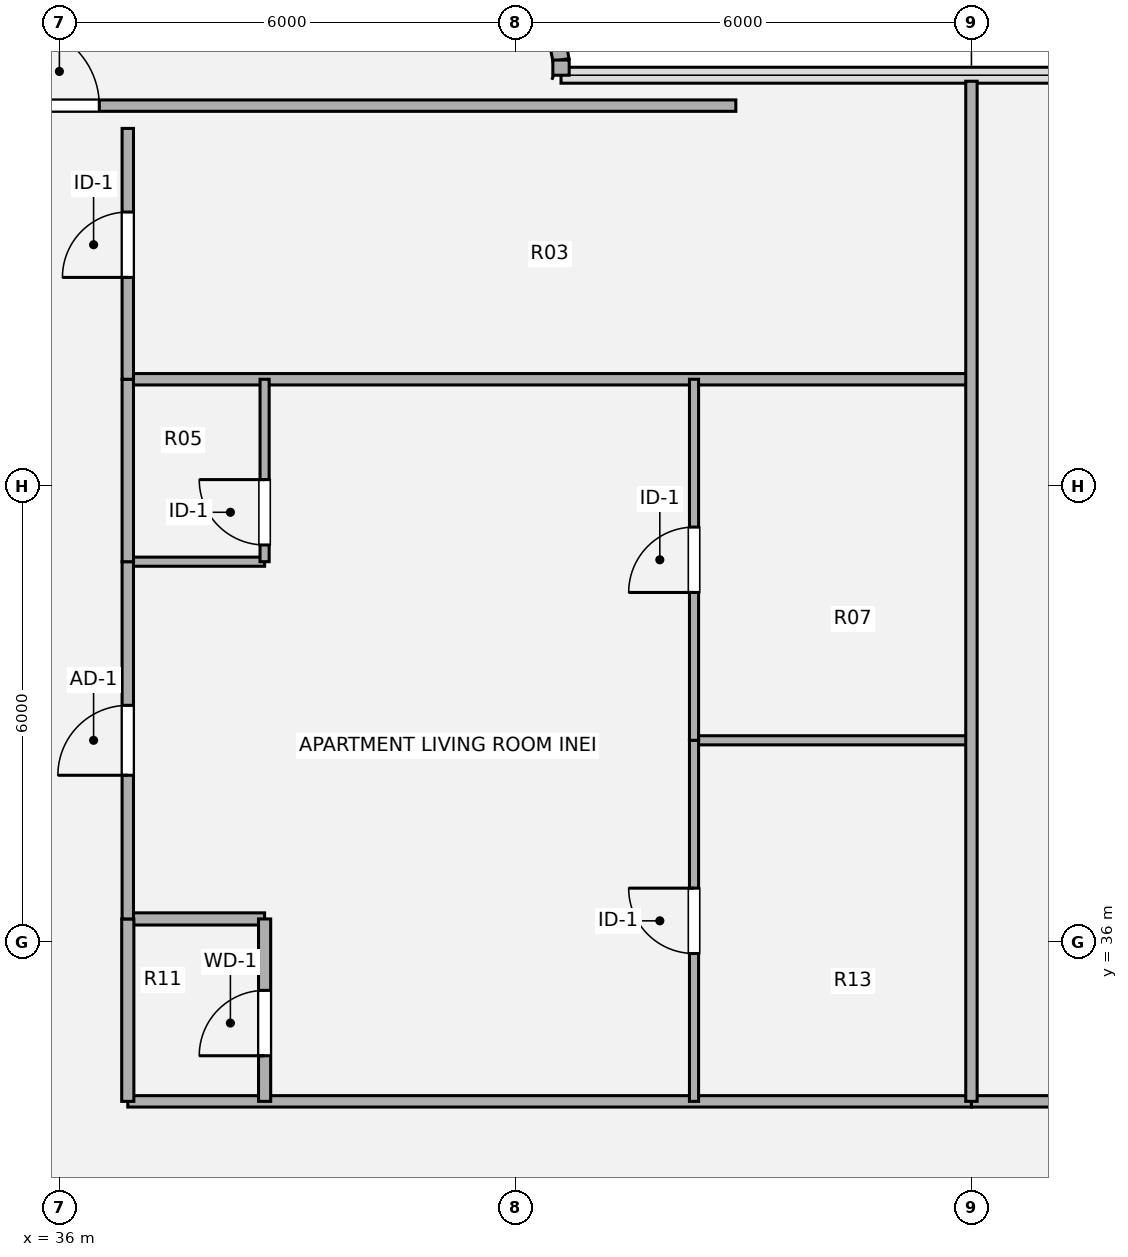
"""IFC4 building model, lengths in metres.
Left out: names, types, materials, properties, quantities, classifications, styles, units other than length and angle.
Written with IfcOpenShell. Run it as: python <this file> out.ifc"""

import sys

from ifc_helpers import new_model, si_unit, direction, frame, frame_2d, origin, origin_2d, place, context, subcontext, project, spatial, rectangle, extrude, source, transform, mapped, element, fill, save


model = new_model("IFC4")
c1 = context("Model", 3, precision=1e-05, world=origin(), true_north=direction((0.0, 1.0)))
c2 = subcontext(c1, "Body", "Model", "MODEL_VIEW")
j1 = project(units=[si_unit("LENGTHUNIT", "METRE"), si_unit("PLANEANGLEUNIT", "RADIAN")], contexts=[c1])
p1 = place(None, origin())
s1 = spatial("IfcSite", under=j1, at=p1, CompositionType="ELEMENT")
p2 = place(p1, origin())
s2 = spatial("IfcBuilding", under=s1, at=p2, CompositionType="ELEMENT")
p3 = place(p2, frame((0.0, 0.0, 89.82)))
s3 = spatial("IfcBuildingStorey", under=s2, at=p3, CompositionType="ELEMENT", Elevation=89.82)
p4 = place(p3, frame((42.387, 48.671, 0.0), z_axis=(0.0, 0.0, 1.0), x_axis=(0.195127417394, -0.980777900945, 0.0)))
e1 = element("IfcWall", 1, at=p4, inside=s3, PredefinedType="SOLIDWALL", context=c2, shape_type="SweptSolid", body=[
    extrude(rectangle(XDim=1.092, YDim=0.215, at=frame_2d((0.546, 0.0))), origin(), (0.0, 0.0, 1.0), 3.53),
])
p5 = place(p3, frame((42.6, 47.6, 0.0), z_axis=(0.0, 0.0, 1.0), x_axis=(0.0, -1.0, 0.0)))
e2 = element("IfcWall", 2, at=p5, inside=s3, PredefinedType="SOLIDWALL", context=c2, shape_type="SweptSolid", body=[
    extrude(rectangle(XDim=0.2, YDim=0.215, at=frame_2d((0.1, 0.0))), origin(), (0.0, 0.0, 1.0), 3.53),
])
p6 = place(p3, frame((36.9, 33.9, 0.0), z_axis=(0.0, 0.0, 1.0), x_axis=(1.0, 0.0, 0.0)))
e3 = element("IfcWall", 3, at=p6, inside=s3, PredefinedType="PARTITIONING", context=c2, shape_type="SweptSolid", body=[
    extrude(rectangle(XDim=11.1, YDim=0.15, at=frame_2d((5.55, 0.0))), origin(), (0.0, 0.0, 1.0), 2.982),
])
p7 = place(p3, frame((48.0, 33.9, 0.0), z_axis=(0.0, 0.0, 1.0), x_axis=(1.0, 0.0, 0.0)))
e4 = element("IfcWall", 4, at=p7, inside=s3, PredefinedType="PARTITIONING", context=c2, shape_type="SweptSolid", body=[
    extrude(rectangle(XDim=10.02, YDim=0.15, at=frame_2d((5.01, 0.0))), origin(), (0.0, 0.0, 1.0), 2.982),
])
p8 = place(p7, frame((2.275, 0.0, 0.0)))
e5 = element("IfcOpeningElement", 5, at=p8, cuts=e4, PredefinedType="OPENING", context=c2, shape_type="SweptSolid", body=[
    extrude(rectangle(XDim=1.05, YDim=2.1, at=origin_2d()), frame((0.525, 0.085, 1.05), z_axis=(0.0, -1.0, 0.0), x_axis=(1.0, 0.0, 0.0)), (0.0, 0.0, 1.0), 0.17),
])
p9 = place(p3, frame((36.9, 36.3, 0.0), z_axis=(0.0, 0.0, 1.0), x_axis=(1.0, 0.0, 0.0)))
e6 = element("IfcWall", 6, at=p9, inside=s3, PredefinedType="PLUMBINGWALL", context=c2, shape_type="SweptSolid", body=[
    extrude(rectangle(XDim=1.8, YDim=0.16, at=frame_2d((0.9, 0.0))), origin(), (0.0, 0.0, 1.0), 3.259),
])
p10 = place(p3, frame((44.35, 38.65, 0.0), z_axis=(0.0, 0.0, 1.0), x_axis=(1.0, 0.0, 0.0)))
e7 = element("IfcWall", 7, at=p10, inside=s3, PredefinedType="PARTITIONING", context=c2, shape_type="SweptSolid", body=[
    extrude(rectangle(XDim=3.65, YDim=0.12, at=frame_2d((1.825, 0.0))), origin(), (0.0, 0.0, 1.0), 2.903),
])
p11 = place(p3, frame((36.9, 41.0, 0.0), z_axis=(0.0, 0.0, 1.0), x_axis=(1.0, 0.0, 0.0)))
e8 = element("IfcWall", 8, at=p11, inside=s3, PredefinedType="PARTITIONING", context=c2, shape_type="SweptSolid", body=[
    extrude(rectangle(XDim=1.8, YDim=0.12, at=frame_2d((0.9, 0.0))), origin(), (0.0, 0.0, 1.0), 3.259),
])
p12 = place(p3, frame((36.9, 43.4, 0.0), z_axis=(0.0, 0.0, 1.0), x_axis=(1.0, 0.0, 0.0)))
e9 = element("IfcWall", 9, at=p12, inside=s3, PredefinedType="PARTITIONING", context=c2, shape_type="SweptSolid", body=[
    extrude(rectangle(XDim=11.1, YDim=0.15, at=frame_2d((5.55, 0.0))), origin(), (0.0, 0.0, 1.0), 3.308),
])
p13 = place(p3, frame((27.1, 47.0, 0.0), z_axis=(0.0, 0.0, 1.0), x_axis=(1.0, 0.0, 0.0)))
e10 = element("IfcWall", 10, at=p13, inside=s3, PredefinedType="PARTITIONING", context=c2, shape_type="SweptSolid", body=[
    extrude(rectangle(XDim=17.8, YDim=0.15, at=frame_2d((8.9, 0.0))), origin(), (0.0, 0.0, 1.0), 3.308),
])
p14 = place(p13, frame((8.375, 0.0, 0.0)))
e11 = element("IfcOpeningElement", 11, at=p14, cuts=e10, PredefinedType="OPENING", context=c2, shape_type="SweptSolid", body=[
    extrude(rectangle(XDim=1.05, YDim=2.1, at=origin_2d()), frame((0.525, 0.085, 1.05), z_axis=(0.0, -1.0, 0.0), x_axis=(1.0, 0.0, 0.0)), (0.0, 0.0, 1.0), 0.17),
])
p15 = place(p3, frame((36.9, 33.9, 0.0), z_axis=(0.0, 0.0, 1.0), x_axis=(0.0, 1.0, 0.0)))
e12 = element("IfcWall", 12, at=p15, inside=s3, PredefinedType="PLUMBINGWALL", context=c2, shape_type="SweptSolid", body=[
    extrude(rectangle(XDim=2.4, YDim=0.16, at=frame_2d((1.2, 0.0))), origin(), (0.0, 0.0, 1.0), 3.5),
])
p16 = place(p3, frame((36.9, 36.3, 0.0), z_axis=(0.0, 0.0, 1.0), x_axis=(0.0, 1.0, 0.0)))
e13 = element("IfcWall", 13, at=p16, inside=s3, PredefinedType="PARTITIONING", context=c2, shape_type="SweptSolid", body=[
    extrude(rectangle(XDim=4.7, YDim=0.15, at=frame_2d((2.35, 0.0))), origin(), (0.0, 0.0, 1.0), 3.5),
])
p17 = place(p16, frame((1.89, 0.0, 0.0)))
e14 = element("IfcOpeningElement", 14, at=p17, cuts=e13, PredefinedType="OPENING", context=c2, shape_type="SweptSolid", body=[
    extrude(rectangle(XDim=0.92, YDim=2.1, at=origin_2d()), frame((0.46, 0.085, 1.05), z_axis=(0.0, -1.0, 0.0), x_axis=(1.0, 0.0, 0.0)), (0.0, 0.0, 1.0), 0.17),
])
p18 = place(p3, frame((36.9, 41.0, 0.0), z_axis=(0.0, 0.0, 1.0), x_axis=(0.0, 1.0, 0.0)))
e15 = element("IfcWall", 15, at=p18, inside=s3, PredefinedType="PARTITIONING", context=c2, shape_type="SweptSolid", body=[
    extrude(rectangle(XDim=2.4, YDim=0.15, at=frame_2d((1.2, 0.0))), origin(), (0.0, 0.0, 1.0), 3.5),
])
p19 = place(p3, frame((36.9, 43.4, 0.0), z_axis=(0.0, 0.0, 1.0), x_axis=(0.0, 1.0, 0.0)))
e16 = element("IfcWall", 16, at=p19, inside=s3, PredefinedType="PARTITIONING", context=c2, shape_type="SweptSolid", body=[
    extrude(rectangle(XDim=3.3, YDim=0.15, at=frame_2d((1.65, 0.0))), origin(), (0.0, 0.0, 1.0), 3.5),
])
p20 = place(p19, frame((1.34, 0.0, 0.0)))
e17 = element("IfcOpeningElement", 17, at=p20, cuts=e16, PredefinedType="OPENING", context=c2, shape_type="SweptSolid", body=[
    extrude(rectangle(XDim=0.86, YDim=2.1, at=origin_2d()), frame((0.43, 0.085, 1.05), z_axis=(0.0, -1.0, 0.0), x_axis=(1.0, 0.0, 0.0)), (0.0, 0.0, 1.0), 0.17),
])
p21 = place(p3, frame((38.7, 33.9, 0.0), z_axis=(0.0, 0.0, 1.0), x_axis=(0.0, 1.0, 0.0)))
e18 = element("IfcWall", 18, at=p21, inside=s3, PredefinedType="PLUMBINGWALL", context=c2, shape_type="SweptSolid", body=[
    extrude(rectangle(XDim=2.4, YDim=0.16, at=frame_2d((1.2, 0.0))), origin(), (0.0, 0.0, 1.0), 3.5),
])
p22 = place(p21, frame((0.6, 0.0, 0.0)))
e19 = element("IfcOpeningElement", 19, at=p22, cuts=e18, PredefinedType="OPENING", context=c2, shape_type="SweptSolid", body=[
    extrude(rectangle(XDim=0.86, YDim=2.1, at=origin_2d()), frame((0.43, 0.09, 1.05), z_axis=(0.0, -1.0, 0.0), x_axis=(1.0, 0.0, 0.0)), (0.0, 0.0, 1.0), 0.18),
])
p23 = place(p3, frame((38.7, 41.0, 0.0), z_axis=(0.0, 0.0, 1.0), x_axis=(0.0, 1.0, 0.0)))
e20 = element("IfcWall", 20, at=p23, inside=s3, PredefinedType="PARTITIONING", context=c2, shape_type="SweptSolid", body=[
    extrude(rectangle(XDim=2.4, YDim=0.12, at=frame_2d((1.2, 0.0))), origin(), (0.0, 0.0, 1.0), 3.5),
])
p24 = place(p23, frame((0.22, 0.0, 0.0)))
e21 = element("IfcOpeningElement", 21, at=p24, cuts=e20, PredefinedType="OPENING", context=c2, shape_type="SweptSolid", body=[
    extrude(rectangle(XDim=0.86, YDim=2.1, at=origin_2d()), frame((0.43, 0.07, 1.05), z_axis=(0.0, -1.0, 0.0), x_axis=(1.0, 0.0, 0.0)), (0.0, 0.0, 1.0), 0.14),
])
p25 = place(p3, frame((44.35, 33.9, 0.0), z_axis=(0.0, 0.0, 1.0), x_axis=(0.0, 1.0, 0.0)))
e22 = element("IfcWall", 22, at=p25, inside=s3, PredefinedType="PARTITIONING", context=c2, shape_type="SweptSolid", body=[
    extrude(rectangle(XDim=4.75, YDim=0.12, at=frame_2d((2.375, 0.0))), origin(), (0.0, 0.0, 1.0), 3.5),
])
p26 = place(p25, frame((1.945, 0.0, 0.0)))
e23 = element("IfcOpeningElement", 23, at=p26, cuts=e22, PredefinedType="OPENING", context=c2, shape_type="SweptSolid", body=[
    extrude(rectangle(XDim=0.86, YDim=2.1, at=origin_2d()), frame((0.43, 0.07, 1.05), z_axis=(0.0, -1.0, 0.0), x_axis=(1.0, 0.0, 0.0)), (0.0, 0.0, 1.0), 0.14),
])
p27 = place(p3, frame((44.35, 38.65, 0.0), z_axis=(0.0, 0.0, 1.0), x_axis=(0.0, 1.0, 0.0)))
e24 = element("IfcWall", 24, at=p27, inside=s3, PredefinedType="PARTITIONING", context=c2, shape_type="SweptSolid", body=[
    extrude(rectangle(XDim=4.75, YDim=0.12, at=frame_2d((2.375, 0.0))), origin(), (0.0, 0.0, 1.0), 3.5),
])
p28 = place(p27, frame((1.945, 0.0, 0.0)))
e25 = element("IfcOpeningElement", 25, at=p28, cuts=e24, PredefinedType="OPENING", context=c2, shape_type="SweptSolid", body=[
    extrude(rectangle(XDim=0.86, YDim=2.1, at=origin_2d()), frame((0.43, 0.07, 1.05), z_axis=(0.0, -1.0, 0.0), x_axis=(1.0, 0.0, 0.0)), (0.0, 0.0, 1.0), 0.14),
])
p29 = place(p3, frame((48.0, 33.9, 0.0), z_axis=(0.0, 0.0, 1.0), x_axis=(0.0, 1.0, 0.0)))
e26 = element("IfcWall", 26, at=p29, inside=s3, PredefinedType="PARTITIONING", context=c2, shape_type="SweptSolid", body=[
    extrude(rectangle(XDim=13.421, YDim=0.15, at=frame_2d((6.71, 0.0))), origin(), (0.0, 0.0, 1.0), 3.5),
])
m1 = source(origin(), c2, "Body", "SweptSolid", [
    extrude(rectangle(XDim=1.05, YDim=2.1, at=origin_2d()), frame((0.525, 0.025, 1.05), z_axis=(0.0, -1.0, 0.0), x_axis=(1.0, 0.0, 0.0)), (0.0, 0.0, 1.0), 0.05),
])
p30 = place(p14, origin())
e27 = element("IfcDoor", 27, at=p30, inside=s3, OperationType="SINGLE_SWING_LEFT", PredefinedType="DOOR", context=c2, shape_type="MappedRepresentation", body=[
    mapped(m1, transform((0.0, 0.0, 0.0), x_axis=(1.0, 0.0, 0.0), y_axis=(0.0, 1.0, 0.0), z_axis=(0.0, 0.0, 1.0), scale=1.0)),
])
fill(e11, e27)
m2 = source(origin(), c2, "Body", "SweptSolid", [
    extrude(rectangle(XDim=0.92, YDim=2.1, at=origin_2d()), frame((0.46, 0.025, 1.05), z_axis=(0.0, -1.0, 0.0), x_axis=(1.0, 0.0, 0.0)), (0.0, 0.0, 1.0), 0.05),
])
p31 = place(p17, origin())
e28 = element("IfcDoor", 28, at=p31, inside=s3, OperationType="SINGLE_SWING_LEFT", PredefinedType="DOOR", context=c2, shape_type="MappedRepresentation", body=[
    mapped(m2, transform((0.0, 0.0, 0.0), x_axis=(1.0, 0.0, 0.0), y_axis=(0.0, 1.0, 0.0), z_axis=(0.0, 0.0, 1.0), scale=1.0)),
])
fill(e14, e28)
m3 = source(origin(), c2, "Body", "SweptSolid", [
    extrude(rectangle(XDim=0.86, YDim=2.1, at=origin_2d()), frame((0.43, 0.025, 1.05), z_axis=(0.0, -1.0, 0.0), x_axis=(1.0, 0.0, 0.0)), (0.0, 0.0, 1.0), 0.05),
])
p32 = place(p20, origin())
e29 = element("IfcDoor", 29, at=p32, inside=s3, OperationType="SINGLE_SWING_LEFT", PredefinedType="DOOR", context=c2, shape_type="MappedRepresentation", body=[
    mapped(m3, transform((0.0, 0.0, 0.0), x_axis=(1.0, 0.0, 0.0), y_axis=(0.0, 1.0, 0.0), z_axis=(0.0, 0.0, 1.0), scale=1.0)),
])
fill(e17, e29)
m4 = source(origin(), c2, "Body", "SweptSolid", [
    extrude(rectangle(XDim=0.86, YDim=2.1, at=origin_2d()), frame((0.43, 0.025, 1.05), z_axis=(0.0, -1.0, 0.0), x_axis=(1.0, 0.0, 0.0)), (0.0, 0.0, 1.0), 0.05),
])
p33 = place(p22, origin())
e30 = element("IfcDoor", 30, at=p33, inside=s3, OperationType="SINGLE_SWING_LEFT", PredefinedType="DOOR", context=c2, shape_type="MappedRepresentation", body=[
    mapped(m4, transform((0.0, 0.0, 0.0), x_axis=(1.0, 0.0, 0.0), y_axis=(0.0, 1.0, 0.0), z_axis=(0.0, 0.0, 1.0), scale=1.0)),
])
fill(e19, e30)
p34 = place(p24, origin())
e31 = element("IfcDoor", 31, at=p34, inside=s3, OperationType="SINGLE_SWING_RIGHT", PredefinedType="DOOR", context=c2, shape_type="MappedRepresentation", body=[
    mapped(m3, transform((0.0, 0.0, 0.0), x_axis=(1.0, 0.0, 0.0), y_axis=(0.0, 1.0, 0.0), z_axis=(0.0, 0.0, 1.0), scale=1.0)),
])
fill(e21, e31)
p35 = place(p26, origin())
e32 = element("IfcDoor", 32, at=p35, inside=s3, OperationType="SINGLE_SWING_RIGHT", PredefinedType="DOOR", context=c2, shape_type="MappedRepresentation", body=[
    mapped(m3, transform((0.0, 0.0, 0.0), x_axis=(1.0, 0.0, 0.0), y_axis=(0.0, 1.0, 0.0), z_axis=(0.0, 0.0, 1.0), scale=1.0)),
])
fill(e23, e32)
p36 = place(p28, origin())
e33 = element("IfcDoor", 33, at=p36, inside=s3, OperationType="SINGLE_SWING_LEFT", PredefinedType="DOOR", context=c2, shape_type="MappedRepresentation", body=[
    mapped(m3, transform((0.0, 0.0, 0.0), x_axis=(1.0, 0.0, 0.0), y_axis=(0.0, 1.0, 0.0), z_axis=(0.0, 0.0, 1.0), scale=1.0)),
])
fill(e25, e33)
save(model, sys.argv[1])
